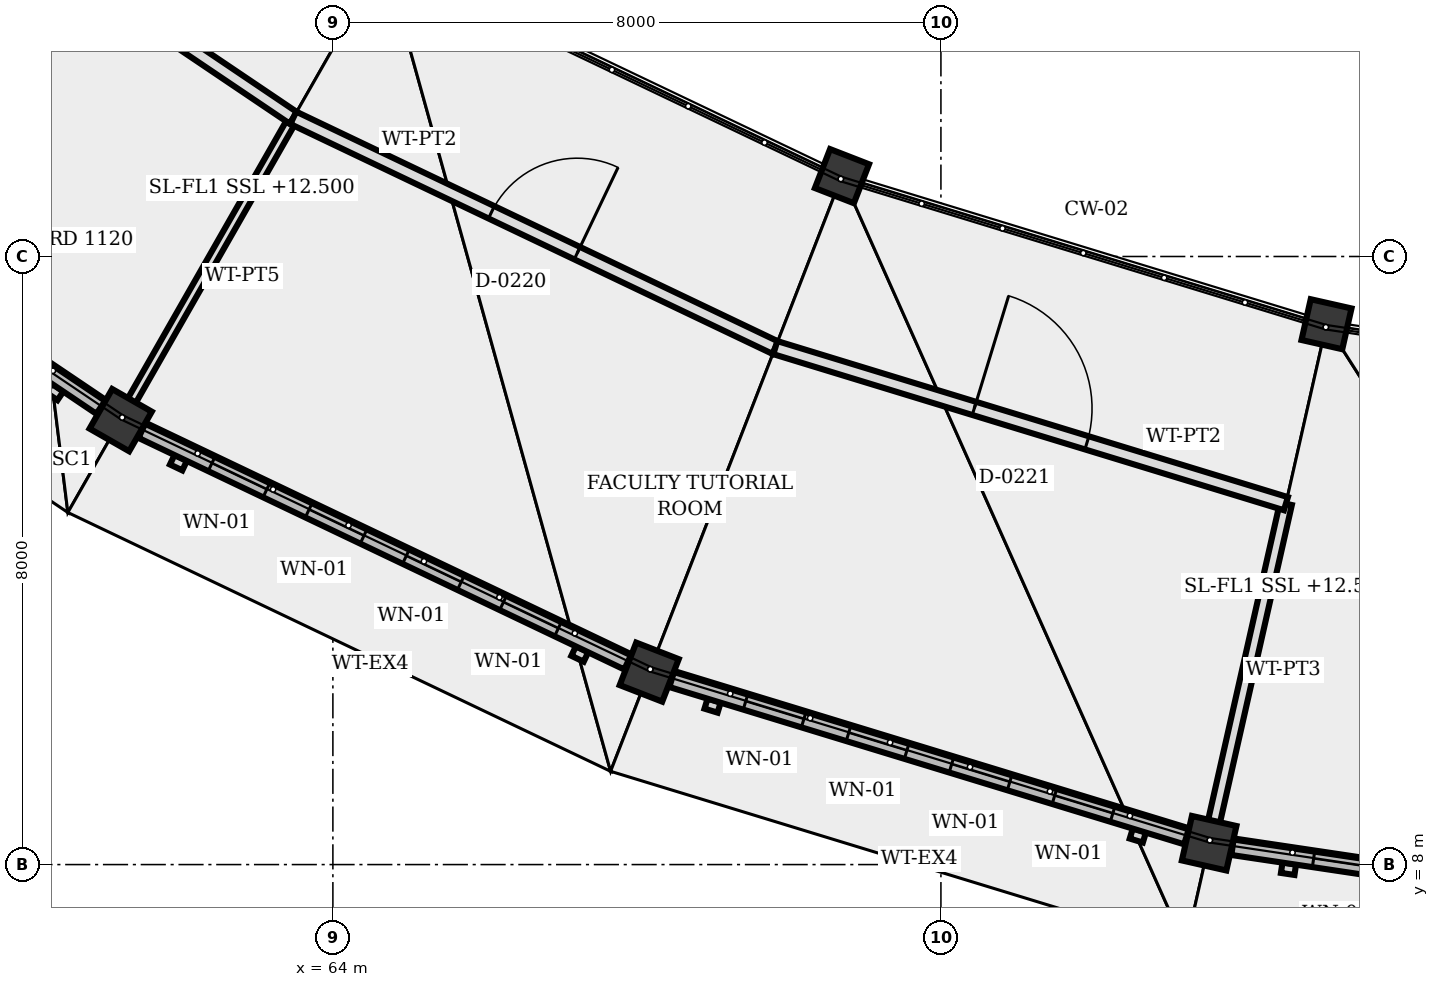
"""IFC4 building model, lengths in metres.
Left out: names, types, materials, properties, quantities, classifications, styles, units other than length and angle.
Written with IfcOpenShell. Run it as: python <this file> out.ifc"""

import sys

from ifc_helpers import new_model, si_unit, direction, frame, frame_2d, origin, origin_2d, place, context, subcontext, project, spatial, rectangle, extrude, element, fill, save


model = new_model("IFC4")
c1 = context("Model", 3, precision=1e-05, world=origin(), true_north=direction((0.0, 1.0)))
c2 = subcontext(c1, "Body", "Model", "MODEL_VIEW")
j1 = project(units=[si_unit("LENGTHUNIT", "METRE"), si_unit("PLANEANGLEUNIT", "RADIAN")], contexts=[c1])
p1 = place(None, origin())
s1 = spatial("IfcSite", under=j1, at=p1, CompositionType="ELEMENT")
p2 = place(p1, origin())
s2 = spatial("IfcBuilding", under=s1, at=p2, CompositionType="ELEMENT")
p3 = place(p2, frame((0.0, 0.0, 12.5)))
s3 = spatial("IfcBuildingStorey", under=s2, at=p3, CompositionType="ELEMENT", Elevation=12.5)
for number, where, z_axis, x_axis in (
    (1, (70.698, 17.057, 0.0), (0.0, 0.0, 1.0), (-0.362, -0.932, 0.0)),
    (2, (77.073, 15.109, 0.0), (0.0, 0.0, 1.0), (-0.221, -0.975, 0.0)),
):
    element("IfcColumn", number, at=place(p3, frame(where, z_axis=z_axis, x_axis=x_axis)), inside=s3, PredefinedType="COLUMN", context=c2, shape_type="SweptSolid", body=[
        extrude(rectangle(XDim=0.55, YDim=0.55, at=origin_2d()), origin(), (0.0, 0.0, 1.0), 2.64),
    ])
for number, where, z_axis, x_axis in (
    (3, (61.208, 13.847, 0.0), (0.0, 0.0, 1.0), (-0.496, -0.868, 0.0)),
    (4, (68.162, 10.532, 0.0), (0.0, 0.0, 1.0), (-0.362, -0.932, 0.0)),
    (5, (75.529, 8.281, 0.0), (0.0, 0.0, 1.0), (-0.221, -0.975, 0.0)),
):
    element("IfcColumn", number, at=place(p3, frame(where, z_axis=z_axis, x_axis=x_axis)), inside=s3, PredefinedType="COLUMN", context=c2, shape_type="SweptSolid", body=[
        extrude(rectangle(XDim=0.6, YDim=0.6, at=origin_2d()), origin(), (0.0, 0.0, 1.0), 4.16),
    ])
p4 = place(p3, frame((60.95, 14.021, 0.0), z_axis=(0.0, 0.0, 1.0), x_axis=(-0.829217797208, 0.558925616512, 0.0)))
e6 = element("IfcWall", 6, at=p4, inside=s3, PredefinedType="SOLIDWALL", context=c2, shape_type="SweptSolid", body=[
    extrude(rectangle(XDim=7.082, YDim=0.22, at=frame_2d((3.541, 0.0))), origin(), (0.0, 0.0, 1.0), 3.537),
])
p5 = place(p4, frame((1.016, 0.0, 0.85)))
e7 = element("IfcOpeningElement", 7, at=p5, cuts=e6, PredefinedType="OPENING", context=c2, shape_type="SweptSolid", body=[
    extrude(rectangle(XDim=0.8, YDim=1.1, at=frame_2d((0.4, 0.55))), frame((0.0, 0.12, 0.0), z_axis=(0.0, -1.0, 0.0), x_axis=(1.0, 0.0, 0.0)), (0.0, 0.0, 1.0), 0.24),
])
p6 = place(p4, frame((2.433, 0.0, 0.85)))
e8 = element("IfcOpeningElement", 8, at=p6, cuts=e6, PredefinedType="OPENING", context=c2, shape_type="SweptSolid", body=[
    extrude(rectangle(XDim=0.8, YDim=1.1, at=frame_2d((0.4, 0.55))), frame((0.0, 0.12, 0.0), z_axis=(0.0, -1.0, 0.0), x_axis=(1.0, 0.0, 0.0)), (0.0, 0.0, 1.0), 0.24),
])
p7 = place(p4, frame((3.849, 0.0, 0.85)))
e9 = element("IfcOpeningElement", 9, at=p7, cuts=e6, PredefinedType="OPENING", context=c2, shape_type="SweptSolid", body=[
    extrude(rectangle(XDim=0.8, YDim=1.1, at=frame_2d((0.4, 0.55))), frame((0.0, 0.12, 0.0), z_axis=(0.0, -1.0, 0.0), x_axis=(1.0, 0.0, 0.0)), (0.0, 0.0, 1.0), 0.24),
])
p8 = place(p4, frame((5.265, 0.0, 0.85)))
e10 = element("IfcOpeningElement", 10, at=p8, cuts=e6, PredefinedType="OPENING", context=c2, shape_type="SweptSolid", body=[
    extrude(rectangle(XDim=0.8, YDim=1.1, at=frame_2d((0.4, 0.55))), frame((0.0, 0.12, 0.0), z_axis=(0.0, -1.0, 0.0), x_axis=(1.0, 0.0, 0.0)), (0.0, 0.0, 1.0), 0.24),
])
p9 = place(p3, frame((67.881, 10.666, 0.0), z_axis=(0.0, 0.0, 1.0), x_axis=(-0.902694754948, 0.430281511792, 0.0)))
e11 = element("IfcWall", 11, at=p9, inside=s3, PredefinedType="SOLIDWALL", context=c2, shape_type="SweptSolid", body=[
    extrude(rectangle(XDim=7.081, YDim=0.22, at=frame_2d((3.541, 0.0))), origin(), (0.0, 0.0, 1.0), 3.537),
])
p10 = place(p9, frame((1.016, 0.0, 0.85)))
e12 = element("IfcOpeningElement", 12, at=p10, cuts=e11, PredefinedType="OPENING", context=c2, shape_type="SweptSolid", body=[
    extrude(rectangle(XDim=0.8, YDim=1.1, at=frame_2d((0.4, 0.55))), frame((0.0, 0.12, 0.0), z_axis=(0.0, -1.0, 0.0), x_axis=(1.0, 0.0, 0.0)), (0.0, 0.0, 1.0), 0.24),
])
p11 = place(p9, frame((2.432, 0.0, 0.85)))
e13 = element("IfcOpeningElement", 13, at=p11, cuts=e11, PredefinedType="OPENING", context=c2, shape_type="SweptSolid", body=[
    extrude(rectangle(XDim=0.8, YDim=1.1, at=frame_2d((0.4, 0.55))), frame((0.0, 0.12, 0.0), z_axis=(0.0, -1.0, 0.0), x_axis=(1.0, 0.0, 0.0)), (0.0, 0.0, 1.0), 0.24),
])
p12 = place(p9, frame((3.849, 0.0, 0.85)))
e14 = element("IfcOpeningElement", 14, at=p12, cuts=e11, PredefinedType="OPENING", context=c2, shape_type="SweptSolid", body=[
    extrude(rectangle(XDim=0.8, YDim=1.1, at=frame_2d((0.4, 0.55))), frame((0.0, 0.12, 0.0), z_axis=(0.0, -1.0, 0.0), x_axis=(1.0, 0.0, 0.0)), (0.0, 0.0, 1.0), 0.24),
])
p13 = place(p9, frame((5.265, 0.0, 0.85)))
e15 = element("IfcOpeningElement", 15, at=p13, cuts=e11, PredefinedType="OPENING", context=c2, shape_type="SweptSolid", body=[
    extrude(rectangle(XDim=0.8, YDim=1.1, at=frame_2d((0.4, 0.55))), frame((0.0, 0.12, 0.0), z_axis=(0.0, -1.0, 0.0), x_axis=(1.0, 0.0, 0.0)), (0.0, 0.0, 1.0), 0.24),
])
p14 = place(p3, frame((75.232, 8.372, 0.0), z_axis=(0.0, 0.0, 1.0), x_axis=(-0.956377793717, 0.292132702183, 0.0)))
e16 = element("IfcWall", 16, at=p14, inside=s3, PredefinedType="SOLIDWALL", context=c2, shape_type="SweptSolid", body=[
    extrude(rectangle(XDim=7.082, YDim=0.22, at=frame_2d((3.541, 0.0))), origin(), (0.0, 0.0, 1.0), 3.537),
])
p15 = place(p14, frame((1.016, 0.0, 0.85)))
e17 = element("IfcOpeningElement", 17, at=p15, cuts=e16, PredefinedType="OPENING", context=c2, shape_type="SweptSolid", body=[
    extrude(rectangle(XDim=0.8, YDim=1.1, at=frame_2d((0.4, 0.55))), frame((0.0, 0.12, 0.0), z_axis=(0.0, -1.0, 0.0), x_axis=(1.0, 0.0, 0.0)), (0.0, 0.0, 1.0), 0.24),
])
p16 = place(p14, frame((2.433, 0.0, 0.85)))
e18 = element("IfcOpeningElement", 18, at=p16, cuts=e16, PredefinedType="OPENING", context=c2, shape_type="SweptSolid", body=[
    extrude(rectangle(XDim=0.8, YDim=1.1, at=frame_2d((0.4, 0.55))), frame((0.0, 0.12, 0.0), z_axis=(0.0, -1.0, 0.0), x_axis=(1.0, 0.0, 0.0)), (0.0, 0.0, 1.0), 0.24),
])
p17 = place(p14, frame((3.849, 0.0, 0.85)))
e19 = element("IfcOpeningElement", 19, at=p17, cuts=e16, PredefinedType="OPENING", context=c2, shape_type="SweptSolid", body=[
    extrude(rectangle(XDim=0.8, YDim=1.1, at=frame_2d((0.4, 0.55))), frame((0.0, 0.12, 0.0), z_axis=(0.0, -1.0, 0.0), x_axis=(1.0, 0.0, 0.0)), (0.0, 0.0, 1.0), 0.24),
])
p18 = place(p14, frame((5.266, 0.0, 0.85)))
e20 = element("IfcOpeningElement", 20, at=p18, cuts=e16, PredefinedType="OPENING", context=c2, shape_type="SweptSolid", body=[
    extrude(rectangle(XDim=0.8, YDim=1.1, at=frame_2d((0.4, 0.55))), frame((0.0, 0.12, 0.0), z_axis=(0.0, -1.0, 0.0), x_axis=(1.0, 0.0, 0.0)), (0.0, 0.0, 1.0), 0.24),
])
p19 = place(p3, frame((83.148, 7.143, 0.0), z_axis=(0.0, 0.0, 1.0), x_axis=(-0.989027735747, 0.147729949309, 0.0)))
e21 = element("IfcWall", 21, at=p19, inside=s3, PredefinedType="SOLIDWALL", context=c2, shape_type="SweptSolid", body=[
    extrude(rectangle(XDim=7.392, YDim=0.22, at=frame_2d((3.696, 0.0))), origin(), (0.0, 0.0, 1.0), 3.85),
])
p20 = place(p19, frame((1.078, 0.0, 0.85)))
e22 = element("IfcOpeningElement", 22, at=p20, cuts=e21, PredefinedType="OPENING", context=c2, shape_type="SweptSolid", body=[
    extrude(rectangle(XDim=0.8, YDim=1.1, at=frame_2d((0.4, 0.55))), frame((0.0, 0.12, 0.0), z_axis=(0.0, -1.0, 0.0), x_axis=(1.0, 0.0, 0.0)), (0.0, 0.0, 1.0), 0.24),
])
p21 = place(p19, frame((2.557, 0.0, 0.85)))
e23 = element("IfcOpeningElement", 23, at=p21, cuts=e21, PredefinedType="OPENING", context=c2, shape_type="SweptSolid", body=[
    extrude(rectangle(XDim=0.8, YDim=1.1, at=frame_2d((0.4, 0.55))), frame((0.0, 0.12, 0.0), z_axis=(0.0, -1.0, 0.0), x_axis=(1.0, 0.0, 0.0)), (0.0, 0.0, 1.0), 0.24),
])
p22 = place(p19, frame((4.035, 0.0, 0.85)))
e24 = element("IfcOpeningElement", 24, at=p22, cuts=e21, PredefinedType="OPENING", context=c2, shape_type="SweptSolid", body=[
    extrude(rectangle(XDim=0.8, YDim=1.1, at=frame_2d((0.4, 0.55))), frame((0.0, 0.12, 0.0), z_axis=(0.0, -1.0, 0.0), x_axis=(1.0, 0.0, 0.0)), (0.0, 0.0, 1.0), 0.24),
])
p23 = place(p19, frame((5.514, 0.0, 0.85)))
e25 = element("IfcOpeningElement", 25, at=p23, cuts=e21, PredefinedType="OPENING", context=c2, shape_type="SweptSolid", body=[
    extrude(rectangle(XDim=0.8, YDim=1.1, at=frame_2d((0.4, 0.55))), frame((0.0, 0.12, 0.0), z_axis=(0.0, -1.0, 0.0), x_axis=(1.0, 0.0, 0.0)), (0.0, 0.0, 1.0), 0.24),
])
p24 = place(p3, frame((63.479, 17.824, 0.0), z_axis=(0.0, 0.0, 1.0), x_axis=(-0.495893608829, -0.868383284456, 0.0)))
e26 = element("IfcWall", 26, at=p24, inside=s3, PredefinedType="PARTITIONING", context=c2, shape_type="SweptSolid", body=[
    extrude(rectangle(XDim=4.287, YDim=0.12, at=frame_2d((2.144, 0.0))), origin(), (0.0, 0.0, 1.0), 3.397),
])
p25 = place(p3, frame((76.539, 12.748, 0.0), z_axis=(0.0, 0.0, 1.0), x_axis=(-0.220636592658, -0.975356085735, 0.0)))
e27 = element("IfcWall", 27, at=p25, inside=s3, PredefinedType="PARTITIONING", context=c2, shape_type="SweptSolid", body=[
    extrude(rectangle(XDim=4.288, YDim=0.16, at=frame_2d((2.144, 0.0))), origin(), (0.0, 0.0, 1.0), 3.397),
])
p26 = place(p3, frame((57.654, 21.751, 0.0), z_axis=(0.0, 0.0, 1.0), x_axis=(0.829168029301, -0.558999444709, 0.0)))
e28 = element("IfcWall", 28, at=p26, inside=s3, PredefinedType="PARTITIONING", context=c2, shape_type="SweptSolid", body=[
    extrude(rectangle(XDim=7.025, YDim=0.18, at=frame_2d((3.513, 0.0))), origin(), (0.0, 0.0, 1.0), 3.397),
])
p27 = place(p26, frame((3.023, 0.0, 0.0)))
e29 = element("IfcOpeningElement", 29, at=p27, cuts=e28, PredefinedType="OPENING", context=c2, shape_type="SweptSolid", body=[
    extrude(rectangle(XDim=0.98, YDim=2.2, at=frame_2d((0.49, 1.1))), frame((0.0, 0.1, 0.0), z_axis=(0.0, -1.0, 0.0), x_axis=(1.0, 0.0, 0.0)), (0.0, 0.0, 1.0), 0.2),
])
p28 = place(p3, frame((63.479, 17.824, 0.0), z_axis=(0.0, 0.0, 1.0), x_axis=(0.90269858831, -0.430273469625, 0.0)))
e30 = element("IfcWall", 30, at=p28, inside=s3, PredefinedType="PARTITIONING", context=c2, shape_type="SweptSolid", body=[
    extrude(rectangle(XDim=7.026, YDim=0.18, at=frame_2d((3.513, 0.0))), origin(), (0.0, 0.0, 1.0), 3.397),
])
p29 = place(p28, frame((2.888, 0.0, 0.0)))
e31 = element("IfcOpeningElement", 31, at=p29, cuts=e30, PredefinedType="OPENING", context=c2, shape_type="SweptSolid", body=[
    extrude(rectangle(XDim=1.25, YDim=2.2, at=frame_2d((0.625, 1.1))), frame((0.0, 0.1, 0.0), z_axis=(0.0, -1.0, 0.0), x_axis=(1.0, 0.0, 0.0)), (0.0, 0.0, 1.0), 0.2),
])
p30 = place(p3, frame((69.821, 14.801, 0.0), z_axis=(0.0, 0.0, 1.0), x_axis=(0.956341588058, -0.292251205218, 0.0)))
e32 = element("IfcWall", 32, at=p30, inside=s3, PredefinedType="PARTITIONING", context=c2, shape_type="SweptSolid", body=[
    extrude(rectangle(XDim=7.025, YDim=0.18, at=frame_2d((3.512, 0.0))), origin(), (0.0, 0.0, 1.0), 3.397),
])
p31 = place(p30, frame((2.737, 0.0, 0.0)))
e33 = element("IfcOpeningElement", 33, at=p31, cuts=e32, PredefinedType="OPENING", context=c2, shape_type="SweptSolid", body=[
    extrude(rectangle(XDim=1.55, YDim=2.2, at=frame_2d((0.775, 1.1))), frame((0.0, 0.1, 0.0), z_axis=(0.0, -1.0, 0.0), x_axis=(1.0, 0.0, 0.0)), (0.0, 0.0, 1.0), 0.2),
])
p32 = place(p10, origin())
e34 = element("IfcWindow", 34, at=p32, inside=s3, PartitioningType="SINGLE_PANEL", PredefinedType="WINDOW", context=c2, shape_type="SweptSolid", body=[
    extrude(rectangle(XDim=0.8, YDim=1.1, at=frame_2d((0.4, 0.55))), frame((0.0, 0.03, 0.0), z_axis=(0.0, -1.0, 0.0), x_axis=(1.0, 0.0, 0.0)), (0.0, 0.0, 1.0), 0.06),
])
fill(e12, e34)
p33 = place(p11, origin())
e35 = element("IfcWindow", 35, at=p33, inside=s3, PartitioningType="SINGLE_PANEL", PredefinedType="WINDOW", context=c2, shape_type="SweptSolid", body=[
    extrude(rectangle(XDim=0.8, YDim=1.1, at=frame_2d((0.4, 0.55))), frame((0.0, 0.03, 0.0), z_axis=(0.0, -1.0, 0.0), x_axis=(1.0, 0.0, 0.0)), (0.0, 0.0, 1.0), 0.06),
])
fill(e13, e35)
p34 = place(p12, origin())
e36 = element("IfcWindow", 36, at=p34, inside=s3, PartitioningType="SINGLE_PANEL", PredefinedType="WINDOW", context=c2, shape_type="SweptSolid", body=[
    extrude(rectangle(XDim=0.8, YDim=1.1, at=frame_2d((0.4, 0.55))), frame((0.0, 0.03, 0.0), z_axis=(0.0, -1.0, 0.0), x_axis=(1.0, 0.0, 0.0)), (0.0, 0.0, 1.0), 0.06),
])
fill(e14, e36)
p35 = place(p13, origin())
e37 = element("IfcWindow", 37, at=p35, inside=s3, PartitioningType="SINGLE_PANEL", PredefinedType="WINDOW", context=c2, shape_type="SweptSolid", body=[
    extrude(rectangle(XDim=0.8, YDim=1.1, at=frame_2d((0.4, 0.55))), frame((0.0, 0.03, 0.0), z_axis=(0.0, -1.0, 0.0), x_axis=(1.0, 0.0, 0.0)), (0.0, 0.0, 1.0), 0.06),
])
fill(e15, e37)
p36 = place(p15, origin())
e38 = element("IfcWindow", 38, at=p36, inside=s3, PartitioningType="SINGLE_PANEL", PredefinedType="WINDOW", context=c2, shape_type="SweptSolid", body=[
    extrude(rectangle(XDim=0.8, YDim=1.1, at=frame_2d((0.4, 0.55))), frame((0.0, 0.03, 0.0), z_axis=(0.0, -1.0, 0.0), x_axis=(1.0, 0.0, 0.0)), (0.0, 0.0, 1.0), 0.06),
])
fill(e17, e38)
p37 = place(p16, origin())
e39 = element("IfcWindow", 39, at=p37, inside=s3, PartitioningType="SINGLE_PANEL", PredefinedType="WINDOW", context=c2, shape_type="SweptSolid", body=[
    extrude(rectangle(XDim=0.8, YDim=1.1, at=frame_2d((0.4, 0.55))), frame((0.0, 0.03, 0.0), z_axis=(0.0, -1.0, 0.0), x_axis=(1.0, 0.0, 0.0)), (0.0, 0.0, 1.0), 0.06),
])
fill(e18, e39)
p38 = place(p17, origin())
e40 = element("IfcWindow", 40, at=p38, inside=s3, PartitioningType="SINGLE_PANEL", PredefinedType="WINDOW", context=c2, shape_type="SweptSolid", body=[
    extrude(rectangle(XDim=0.8, YDim=1.1, at=frame_2d((0.4, 0.55))), frame((0.0, 0.03, 0.0), z_axis=(0.0, -1.0, 0.0), x_axis=(1.0, 0.0, 0.0)), (0.0, 0.0, 1.0), 0.06),
])
fill(e19, e40)
p39 = place(p18, origin())
e41 = element("IfcWindow", 41, at=p39, inside=s3, PartitioningType="SINGLE_PANEL", PredefinedType="WINDOW", context=c2, shape_type="SweptSolid", body=[
    extrude(rectangle(XDim=0.8, YDim=1.1, at=frame_2d((0.4, 0.55))), frame((0.0, 0.03, 0.0), z_axis=(0.0, -1.0, 0.0), x_axis=(1.0, 0.0, 0.0)), (0.0, 0.0, 1.0), 0.06),
])
fill(e20, e41)
p40 = place(p23, origin())
e42 = element("IfcWindow", 42, at=p40, inside=s3, PartitioningType="SINGLE_PANEL", PredefinedType="WINDOW", context=c2, shape_type="SweptSolid", body=[
    extrude(rectangle(XDim=0.8, YDim=1.1, at=frame_2d((0.4, 0.55))), frame((0.0, 0.03, 0.0), z_axis=(0.0, -1.0, 0.0), x_axis=(1.0, 0.0, 0.0)), (0.0, 0.0, 1.0), 0.06),
])
fill(e25, e42)
p41 = place(p29, origin())
e43 = element("IfcDoor", 43, at=p41, inside=s3, OperationType="SINGLE_SWING_RIGHT", PredefinedType="DOOR", context=c2, shape_type="SweptSolid", body=[
    extrude(rectangle(XDim=1.25, YDim=2.2, at=frame_2d((0.625, 1.1))), frame((0.0, 0.025, 0.0), z_axis=(0.0, -1.0, 0.0), x_axis=(1.0, 0.0, 0.0)), (0.0, 0.0, 1.0), 0.05),
])
fill(e31, e43)
p42 = place(p31, origin())
e44 = element("IfcDoor", 44, at=p42, inside=s3, OperationType="SINGLE_SWING_LEFT", PredefinedType="DOOR", context=c2, shape_type="SweptSolid", body=[
    extrude(rectangle(XDim=1.55, YDim=2.2, at=frame_2d((0.775, 1.1))), frame((0.0, 0.025, 0.0), z_axis=(0.0, -1.0, 0.0), x_axis=(1.0, 0.0, 0.0)), (0.0, 0.0, 1.0), 0.05),
])
fill(e33, e44)
save(model, sys.argv[1])
